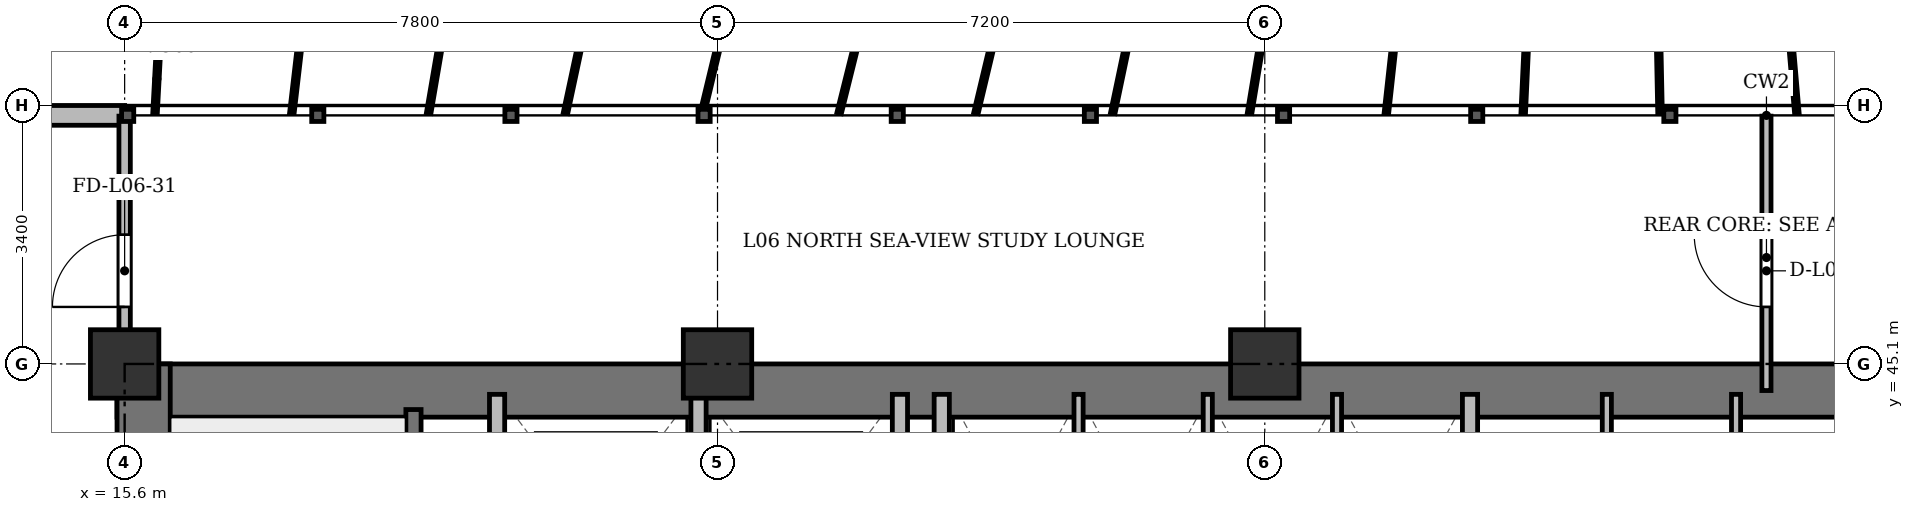
"""IFC4 building model, lengths in metres.
Left out: names, types, materials, properties, quantities, classifications, styles, units other than length and angle.
Written with IfcOpenShell. Run it as: python <this file> out.ifc"""

import sys

from ifc_helpers import new_model, si_unit, direction, frame, frame_2d, origin, origin_2d, place, context, subcontext, project, spatial, rectangle, extrude, source, transform, mapped, element, fill, save


model = new_model("IFC4")
c1 = context("Model", 3, precision=1e-05, world=origin(), true_north=direction((0.0, 1.0)))
c2 = subcontext(c1, "Body", "Model", "MODEL_VIEW")
j1 = project(units=[si_unit("LENGTHUNIT", "METRE"), si_unit("PLANEANGLEUNIT", "RADIAN")], contexts=[c1])
p1 = place(None, origin())
s1 = spatial("IfcSite", under=j1, at=p1, CompositionType="ELEMENT")
p2 = place(p1, origin())
s2 = spatial("IfcBuilding", under=s1, at=p2, CompositionType="ELEMENT")
p3 = place(p2, frame((0.0, 0.0, 27.1)))
s3 = spatial("IfcBuildingStorey", under=s2, at=p3, CompositionType="ELEMENT", Elevation=27.1)
m1 = source(origin(), c2, "Body", "SweptSolid", [
    extrude(rectangle(XDim=0.9, YDim=0.9, at=origin_2d()), origin(), (0.0, 0.0, 1.0), 3.6),
])
for number, where, z_axis, x_axis in (
    (1, (15.6, 45.1, 0.0), (0.0, 0.0, 1.0), (1.0, 0.0, 0.0)),
    (2, (23.4, 45.1, 0.0), (0.0, 0.0, 1.0), (1.0, 0.0, 0.0)),
    (3, (30.6, 45.1, 0.0), (0.0, 0.0, 1.0), (1.0, 0.0, 0.0)),
):
    element("IfcColumn", number, at=place(p3, frame(where, z_axis=z_axis, x_axis=x_axis)), inside=s3, PredefinedType="COLUMN", context=c2, shape_type="MappedRepresentation", body=[
        mapped(m1, transform((0.0, 0.0, 0.0), x_axis=(1.0, 0.0, 0.0), y_axis=(0.0, 1.0, 0.0), z_axis=(0.0, 0.0, 1.0), scale=1.0)),
    ])
p4 = place(p3, frame((7.6, 48.37, 0.0), z_axis=(0.0, 0.0, 1.0), x_axis=(1.0, 0.0, 0.0)))
e4 = element("IfcWall", 4, at=p4, inside=s3, PredefinedType="SOLIDWALL", context=c2, shape_type="SweptSolid", body=[
    extrude(rectangle(XDim=8.0, YDim=0.26, at=frame_2d((4.0, 0.0))), origin(), (0.0, 0.0, 1.0), 3.34),
])
p5 = place(p4, frame((0.768, 0.0, 0.9)))
e5 = element("IfcOpeningElement", 5, at=p5, cuts=e4, PredefinedType="OPENING", context=c2, shape_type="SweptSolid", body=[
    extrude(rectangle(XDim=1.2, YDim=1.65, at=frame_2d((0.6, 0.825))), frame((0.0, 0.14, 0.0), z_axis=(0.0, -1.0, 0.0), x_axis=(1.0, 0.0, 0.0)), (0.0, 0.0, 1.0), 0.28),
])
p6 = place(p4, frame((4.608, 0.0, 0.9)))
e6 = element("IfcOpeningElement", 6, at=p6, cuts=e4, PredefinedType="OPENING", context=c2, shape_type="SweptSolid", body=[
    extrude(rectangle(XDim=1.2, YDim=1.65, at=frame_2d((0.6, 0.825))), frame((0.0, 0.14, 0.0), z_axis=(0.0, -1.0, 0.0), x_axis=(1.0, 0.0, 0.0)), (0.0, 0.0, 1.0), 0.28),
])
p7 = place(p3, frame((15.5, 44.75, 0.0), z_axis=(0.0, 0.0, 1.0), x_axis=(1.0, 0.0, 0.0)))
e7 = element("IfcWall", 7, at=p7, inside=s3, PredefinedType="SHEAR", context=c2, shape_type="SweptSolid", body=[
    extrude(rectangle(XDim=43.4, YDim=0.7, at=frame_2d((21.7, 0.0))), origin(), (0.0, 0.0, 1.0), 3.34),
])
p8 = place(p3, frame((15.85, 33.4, 0.0), z_axis=(0.0, 0.0, 1.0), x_axis=(0.0, 1.0, 0.0)))
e8 = element("IfcWall", 8, at=p8, inside=s3, PredefinedType="SHEAR", context=c2, shape_type="SweptSolid", body=[
    extrude(rectangle(XDim=11.7, YDim=0.7, at=frame_2d((5.85, 0.0))), origin(), (0.0, 0.0, 1.0), 3.34),
])
p9 = place(p3, frame((19.4, 33.4, 0.0), z_axis=(0.0, 0.0, 1.0), x_axis=(0.0, 1.0, 0.0)))
e9 = element("IfcWall", 9, at=p9, inside=s3, PredefinedType="SHEAR", context=c2, shape_type="SweptSolid", body=[
    extrude(rectangle(XDim=11.1, YDim=0.2, at=frame_2d((5.55, 0.0))), origin(), (0.0, 0.0, 1.0), 3.34),
])
p10 = place(p9, frame((0.85, 0.0, 0.0)))
e10 = element("IfcOpeningElement", 10, at=p10, cuts=e9, PredefinedType="OPENING", context=c2, shape_type="SweptSolid", body=[
    extrude(rectangle(XDim=1.1, YDim=2.15, at=frame_2d((0.55, 1.075))), frame((0.0, 0.11, 0.0), z_axis=(0.0, -1.0, 0.0), x_axis=(1.0, 0.0, 0.0)), (0.0, 0.0, 1.0), 0.22),
])
for number, where, z_axis, x_axis in (
    (11, (20.5, 41.3, 0.0), (0.0, 0.0, 1.0), (0.0, 1.0, 0.0)),
    (12, (23.15, 41.3, 0.0), (0.0, 0.0, 1.0), (0.0, 1.0, 0.0)),
    (13, (25.8, 41.3, 0.0), (0.0, 0.0, 1.0), (0.0, 1.0, 0.0)),
):
    element("IfcWall", number, at=place(p3, frame(where, z_axis=z_axis, x_axis=x_axis)), inside=s3, PredefinedType="SOLIDWALL", context=c2, shape_type="SweptSolid", body=[
        extrude(rectangle(XDim=3.4, YDim=0.2, at=frame_2d((1.7, 0.0))), origin(), (0.0, 0.0, 1.0), 3.34),
    ])
p11 = place(p3, frame((26.35, 33.4, 0.0), z_axis=(0.0, 0.0, 1.0), x_axis=(0.0, 1.0, 0.0)))
e14 = element("IfcWall", 14, at=p11, inside=s3, PredefinedType="SOLIDWALL", context=c2, shape_type="SweptSolid", body=[
    extrude(rectangle(XDim=11.3, YDim=0.2, at=frame_2d((5.65, 0.0))), origin(), (0.0, 0.0, 1.0), 2.69),
])
p12 = place(p3, frame((33.3, 41.5, 0.0), z_axis=(0.0, 0.0, 1.0), x_axis=(0.0, 1.0, 0.0)))
e15 = element("IfcWall", 15, at=p12, inside=s3, PredefinedType="SOLIDWALL", context=c2, shape_type="SweptSolid", body=[
    extrude(rectangle(XDim=3.2, YDim=0.2, at=frame_2d((1.6, 0.0))), origin(), (0.0, 0.0, 1.0), 3.34),
])
for number, where, z_axis, x_axis in (
    (16, (28.15, 41.5, 0.0), (0.0, 0.0, 1.0), (0.0, 1.0, 0.0)),
    (17, (29.85, 41.5, 0.0), (0.0, 0.0, 1.0), (0.0, 1.0, 0.0)),
    (18, (31.55, 41.5, 0.0), (0.0, 0.0, 1.0), (0.0, 1.0, 0.0)),
    (19, (35.1, 41.5, 0.0), (0.0, 0.0, 1.0), (0.0, 1.0, 0.0)),
    (20, (36.8, 41.5, 0.0), (0.0, 0.0, 1.0), (0.0, 1.0, 0.0)),
):
    element("IfcWall", number, at=place(p3, frame(where, z_axis=z_axis, x_axis=x_axis)), inside=s3, PredefinedType="PARTITIONING", context=c2, shape_type="SweptSolid", body=[
        extrude(rectangle(XDim=3.2, YDim=0.12, at=frame_2d((1.6, 0.0))), origin(), (0.0, 0.0, 1.0), 3.34),
    ])
p13 = place(p3, frame((37.2, 44.75, 0.0), z_axis=(0.0, 0.0, 1.0), x_axis=(0.0, 1.0, 0.0)))
e21 = element("IfcWall", 21, at=p13, inside=s3, PredefinedType="PARTITIONING", context=c2, shape_type="SweptSolid", body=[
    extrude(rectangle(XDim=3.61, YDim=0.12, at=frame_2d((1.805, 0.0))), origin(), (0.0, 0.0, 1.0), 2.69),
])
p14 = place(p13, frame((1.1, 0.0, 0.0)))
e22 = element("IfcOpeningElement", 22, at=p14, cuts=e21, PredefinedType="OPENING", context=c2, shape_type="SweptSolid", body=[
    extrude(rectangle(XDim=0.95, YDim=2.15, at=frame_2d((0.475, 1.075))), frame((0.0, 0.07, 0.0), z_axis=(0.0, -1.0, 0.0), x_axis=(1.0, 0.0, 0.0)), (0.0, 0.0, 1.0), 0.14),
])
p15 = place(p3, frame((15.6, 44.75, 0.0), z_axis=(0.0, 0.0, 1.0), x_axis=(0.0, 1.0, 0.0)))
e23 = element("IfcWall", 23, at=p15, inside=s3, PredefinedType="PARTITIONING", context=c2, shape_type="SweptSolid", body=[
    extrude(rectangle(XDim=3.61, YDim=0.15, at=frame_2d((1.805, 0.0))), origin(), (0.0, 0.0, 1.0), 2.752),
])
p16 = place(p15, frame((1.1, 0.0, 0.0)))
e24 = element("IfcOpeningElement", 24, at=p16, cuts=e23, PredefinedType="OPENING", context=c2, shape_type="SweptSolid", body=[
    extrude(rectangle(XDim=0.95, YDim=2.15, at=frame_2d((0.475, 1.075))), frame((0.0, 0.085, 0.0), z_axis=(0.0, -1.0, 0.0), x_axis=(1.0, 0.0, 0.0)), (0.0, 0.0, 1.0), 0.17),
])
m2 = source(origin(), c2, "Body", "SweptSolid", [
    extrude(rectangle(XDim=0.95, YDim=2.15, at=frame_2d((0.475, 1.075))), frame((0.0, 0.025, 0.0), z_axis=(0.0, -1.0, 0.0), x_axis=(1.0, 0.0, 0.0)), (0.0, 0.0, 1.0), 0.05),
])
p17 = place(p14, origin())
e25 = element("IfcDoor", 25, at=p17, inside=s3, OperationType="SINGLE_SWING_RIGHT", PredefinedType="DOOR", context=c2, shape_type="MappedRepresentation", body=[
    mapped(m2, transform((0.0, 0.0, 0.0), x_axis=(1.0, 0.0, 0.0), y_axis=(0.0, 1.0, 0.0), z_axis=(0.0, 0.0, 1.0), scale=1.0)),
])
fill(e22, e25)
p18 = place(p16, origin())
e26 = element("IfcDoor", 26, at=p18, inside=s3, OperationType="SINGLE_SWING_LEFT", PredefinedType="DOOR", context=c2, shape_type="MappedRepresentation", body=[
    mapped(m2, transform((0.0, 0.0, 0.0), x_axis=(1.0, 0.0, 0.0), y_axis=(0.0, 1.0, 0.0), z_axis=(0.0, 0.0, 1.0), scale=1.0)),
])
fill(e24, e26)
save(model, sys.argv[1])
